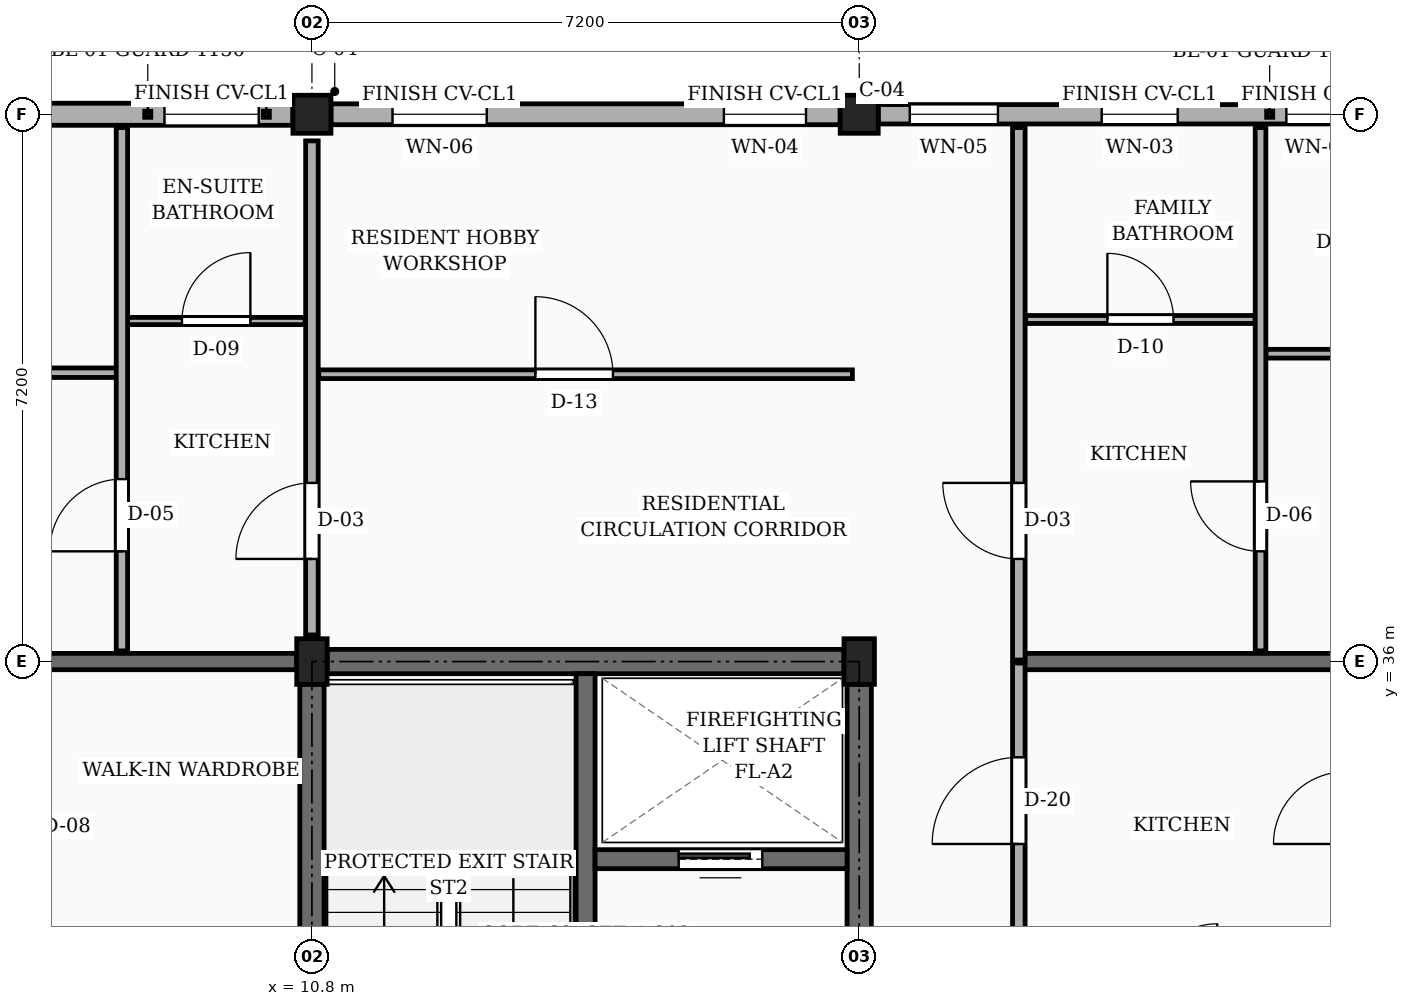
"""IFC4 building model, lengths in metres.
Left out: names, types, materials, properties, quantities, classifications, styles, units other than length and angle.
Written with IfcOpenShell. Run it as: python <this file> out.ifc"""

import sys

from ifc_helpers import new_model, si_unit, direction, frame, frame_2d, origin, origin_2d, place, context, subcontext, project, spatial, rectangle, extrude, element, fill, save


model = new_model("IFC4")
c1 = context("Model", 3, precision=1e-05, world=origin(), true_north=direction((0.0, 1.0)))
c2 = subcontext(c1, "Body", "Model", "MODEL_VIEW")
j1 = project(units=[si_unit("LENGTHUNIT", "METRE"), si_unit("PLANEANGLEUNIT", "RADIAN")], contexts=[c1])
p1 = place(None, origin())
s1 = spatial("IfcSite", under=j1, at=p1, CompositionType="ELEMENT")
p2 = place(p1, origin())
s2 = spatial("IfcBuilding", under=s1, at=p2, CompositionType="ELEMENT")
p3 = place(p2, frame((0.0, 0.0, 32.85)))
s3 = spatial("IfcBuildingStorey", under=s2, at=p3, CompositionType="ELEMENT", Elevation=32.85)
p4 = place(p3, frame((10.8, 36.0, 0.0), z_axis=(0.0, 0.0, 1.0), x_axis=(1.0, 0.0, 0.0)))
e1 = element("IfcColumn", 1, at=p4, inside=s3, PredefinedType="COLUMN", context=c2, shape_type="SweptSolid", body=[
    extrude(rectangle(XDim=0.4, YDim=0.6, at=origin_2d()), origin(), (0.0, 0.0, 1.0), 3.15),
])
p5 = place(p3, frame((10.8, 43.2, 0.0), z_axis=(0.0, 0.0, 1.0), x_axis=(1.0, 0.0, 0.0)))
e2 = element("IfcColumn", 2, at=p5, inside=s3, PredefinedType="COLUMN", context=c2, shape_type="SweptSolid", body=[
    extrude(rectangle(XDim=0.5, YDim=0.5, at=origin_2d()), origin(), (0.0, 0.0, 1.0), 3.15),
])
p6 = place(p3, frame((18.0, 36.0, 0.0), z_axis=(0.0, 0.0, 1.0), x_axis=(1.0, 0.0, 0.0)))
e3 = element("IfcColumn", 3, at=p6, inside=s3, PredefinedType="COLUMN", context=c2, shape_type="SweptSolid", body=[
    extrude(rectangle(XDim=0.4, YDim=0.6, at=origin_2d()), origin(), (0.0, 0.0, 1.0), 3.15),
])
p7 = place(p3, frame((18.0, 43.2, 0.0), z_axis=(0.0, 0.0, 1.0), x_axis=(1.0, 0.0, 0.0)))
e4 = element("IfcColumn", 4, at=p7, inside=s3, PredefinedType="COLUMN", context=c2, shape_type="SweptSolid", body=[
    extrude(rectangle(XDim=0.5, YDim=0.5, at=origin_2d()), origin(), (0.0, 0.0, 1.0), 3.15),
])
p8 = place(p3, frame((3.85, 36.0, 0.0), z_axis=(0.0, 0.0, 1.0), x_axis=(1.0, 0.0, 0.0)))
e5 = element("IfcWall", 5, at=p8, inside=s3, PredefinedType="SOLIDWALL", context=c2, shape_type="SweptSolid", body=[
    extrude(rectangle(XDim=6.75, YDim=0.215, at=frame_2d((3.375, 0.0))), origin(), (0.0, 0.0, 1.0), 2.17),
])
p9 = place(p3, frame((20.1, 36.0, 0.0), z_axis=(0.0, 0.0, 1.0), x_axis=(1.0, 0.0, 0.0)))
e6 = element("IfcWall", 6, at=p9, inside=s3, PredefinedType="SOLIDWALL", context=c2, shape_type="SweptSolid", body=[
    extrude(rectangle(XDim=12.05, YDim=0.215, at=frame_2d((6.025, 0.0))), origin(), (0.0, 0.0, 1.0), 2.17),
])
p10 = place(p3, frame((24.95, 43.2, 0.0), z_axis=(0.0, 0.0, 1.0), x_axis=(-1.0, 0.0, 0.0)))
e7 = element("IfcWall", 7, at=p10, inside=s3, PredefinedType="SOLIDWALL", context=c2, shape_type="SweptSolid", body=[
    extrude(rectangle(XDim=6.7, YDim=0.255, at=frame_2d((3.35, 0.0))), origin(), (0.0, 0.0, 1.0), 2.44),
])
p11 = place(p10, frame((0.48, 0.0, 0.78)))
e8 = element("IfcOpeningElement", 8, at=p11, cuts=e7, PredefinedType="OPENING", context=c2, shape_type="SweptSolid", body=[
    extrude(rectangle(XDim=0.85, YDim=1.15, at=frame_2d((0.425, 0.575))), frame((0.0, 0.137, 0.0), z_axis=(0.0, -1.0, 0.0), x_axis=(1.0, 0.0, 0.0)), (0.0, 0.0, 1.0), 0.275),
])
p12 = place(p10, frame((2.76, 0.0, 0.78)))
e9 = element("IfcOpeningElement", 9, at=p12, cuts=e7, PredefinedType="OPENING", context=c2, shape_type="SweptSolid", body=[
    extrude(rectangle(XDim=1.0, YDim=1.15, at=frame_2d((0.5, 0.575))), frame((0.0, 0.137, 0.0), z_axis=(0.0, -1.0, 0.0), x_axis=(1.0, 0.0, 0.0)), (0.0, 0.0, 1.0), 0.275),
])
p13 = place(p10, frame((5.125, 0.0, 0.78)))
e10 = element("IfcOpeningElement", 10, at=p13, cuts=e7, PredefinedType="OPENING", context=c2, shape_type="SweptSolid", body=[
    extrude(rectangle(XDim=1.16, YDim=1.15, at=frame_2d((0.58, 0.575))), frame((0.0, 0.137, 0.0), z_axis=(0.0, -1.0, 0.0), x_axis=(1.0, 0.0, 0.0)), (0.0, 0.0, 1.0), 0.275),
])
p14 = place(p3, frame((17.75, 43.2, 0.0), z_axis=(0.0, 0.0, 1.0), x_axis=(-1.0, 0.0, 0.0)))
e11 = element("IfcWall", 11, at=p14, inside=s3, PredefinedType="SOLIDWALL", context=c2, shape_type="SweptSolid", body=[
    extrude(rectangle(XDim=6.7, YDim=0.275, at=frame_2d((3.35, 0.0))), origin(), (0.0, 0.0, 1.0), 2.44),
])
p15 = place(p14, frame((0.45, 0.0, 0.78)))
e12 = element("IfcOpeningElement", 12, at=p15, cuts=e11, PredefinedType="OPENING", context=c2, shape_type="SweptSolid", body=[
    extrude(rectangle(XDim=1.08, YDim=1.15, at=frame_2d((0.54, 0.575))), frame((0.0, 0.147, 0.0), z_axis=(0.0, -1.0, 0.0), x_axis=(1.0, 0.0, 0.0)), (0.0, 0.0, 1.0), 0.295),
])
p16 = place(p14, frame((4.65, 0.0, 0.78)))
e13 = element("IfcOpeningElement", 13, at=p16, cuts=e11, PredefinedType="OPENING", context=c2, shape_type="SweptSolid", body=[
    extrude(rectangle(XDim=1.24, YDim=1.15, at=frame_2d((0.62, 0.575))), frame((0.0, 0.147, 0.0), z_axis=(0.0, -1.0, 0.0), x_axis=(1.0, 0.0, 0.0)), (0.0, 0.0, 1.0), 0.295),
])
p17 = place(p3, frame((10.55, 43.2, 0.0), z_axis=(0.0, 0.0, 1.0), x_axis=(-1.0, 0.0, 0.0)))
e14 = element("IfcWall", 14, at=p17, inside=s3, PredefinedType="SOLIDWALL", context=c2, shape_type="SweptSolid", body=[
    extrude(rectangle(XDim=6.7, YDim=0.29, at=frame_2d((3.35, 0.0))), origin(), (0.0, 0.0, 1.0), 2.44),
])
p18 = place(p17, frame((0.45, 0.0, 0.78)))
e15 = element("IfcOpeningElement", 15, at=p18, cuts=e14, PredefinedType="OPENING", context=c2, shape_type="SweptSolid", body=[
    extrude(rectangle(XDim=1.24, YDim=1.15, at=frame_2d((0.62, 0.575))), frame((0.0, 0.155, 0.0), z_axis=(0.0, -1.0, 0.0), x_axis=(1.0, 0.0, 0.0)), (0.0, 0.0, 1.0), 0.31),
])
p19 = place(p17, frame((4.65, 0.0, 0.78)))
e16 = element("IfcOpeningElement", 16, at=p19, cuts=e14, PredefinedType="OPENING", context=c2, shape_type="SweptSolid", body=[
    extrude(rectangle(XDim=1.4, YDim=1.15, at=frame_2d((0.7, 0.575))), frame((0.0, 0.155, 0.0), z_axis=(0.0, -1.0, 0.0), x_axis=(1.0, 0.0, 0.0)), (0.0, 0.0, 1.0), 0.31),
])
p20 = place(p3, frame((10.8, 29.1, 0.0), z_axis=(0.0, 0.0, 1.0), x_axis=(0.0, 1.0, 0.0)))
e17 = element("IfcWall", 17, at=p20, inside=s3, PredefinedType="SHEAR", context=c2, shape_type="SweptSolid", body=[
    extrude(rectangle(XDim=6.6, YDim=0.32, at=frame_2d((3.3, 0.0))), origin(), (0.0, 0.0, 1.0), 2.87),
])
p21 = place(p3, frame((11.0, 36.0, 0.0), z_axis=(0.0, 0.0, 1.0), x_axis=(1.0, 0.0, 0.0)))
e18 = element("IfcWall", 18, at=p21, inside=s3, PredefinedType="SHEAR", context=c2, shape_type="SweptSolid", body=[
    extrude(rectangle(XDim=6.8, YDim=0.32, at=frame_2d((3.4, 0.0))), origin(), (0.0, 0.0, 1.0), 2.87),
])
p22 = place(p3, frame((18.0, 29.1, 0.0), z_axis=(0.0, 0.0, 1.0), x_axis=(0.0, 1.0, 0.0)))
e19 = element("IfcWall", 19, at=p22, inside=s3, PredefinedType="SHEAR", context=c2, shape_type="SweptSolid", body=[
    extrude(rectangle(XDim=6.6, YDim=0.32, at=frame_2d((3.3, 0.0))), origin(), (0.0, 0.0, 1.0), 2.87),
])
p23 = place(p22, frame((1.5, 0.0, 0.0)))
e20 = element("IfcOpeningElement", 20, at=p23, cuts=e19, PredefinedType="OPENING", context=c2, shape_type="SweptSolid", body=[
    extrude(rectangle(XDim=1.1, YDim=2.15, at=frame_2d((0.55, 1.075))), frame((0.0, 0.17, 0.0), z_axis=(0.0, -1.0, 0.0), x_axis=(1.0, 0.0, 0.0)), (0.0, 0.0, 1.0), 0.34),
])
p24 = place(p3, frame((14.4, 28.96, 0.0), z_axis=(0.0, 0.0, 1.0), x_axis=(0.0, 1.0, 0.0)))
e21 = element("IfcWall", 21, at=p24, inside=s3, PredefinedType="SHEAR", context=c2, shape_type="SweptSolid", body=[
    extrude(rectangle(XDim=6.88, YDim=0.25, at=frame_2d((3.44, 0.0))), origin(), (0.0, 0.0, 1.0), 2.87),
])
p25 = place(p24, frame((0.44, 0.0, 0.0)))
e22 = element("IfcOpeningElement", 22, at=p25, cuts=e21, PredefinedType="OPENING", context=c2, shape_type="SweptSolid", body=[
    extrude(rectangle(XDim=1.05, YDim=2.15, at=frame_2d((0.525, 1.075))), frame((0.0, 0.135, 0.0), z_axis=(0.0, -1.0, 0.0), x_axis=(1.0, 0.0, 0.0)), (0.0, 0.0, 1.0), 0.27),
])
p26 = place(p3, frame((14.525, 33.4, 0.0), z_axis=(0.0, 0.0, 1.0), x_axis=(1.0, 0.0, 0.0)))
e23 = element("IfcWall", 23, at=p26, inside=s3, PredefinedType="SHEAR", context=c2, shape_type="SweptSolid", body=[
    extrude(rectangle(XDim=3.315, YDim=0.25, at=frame_2d((1.658, 0.0))), origin(), (0.0, 0.0, 1.0), 2.87),
])
p27 = place(p26, frame((1.1, 0.0, 0.0)))
e24 = element("IfcOpeningElement", 24, at=p27, cuts=e23, PredefinedType="OPENING", context=c2, shape_type="SweptSolid", body=[
    extrude(rectangle(XDim=1.1, YDim=2.2, at=frame_2d((0.55, 1.1))), frame((0.0, 0.135, 0.0), z_axis=(0.0, -1.0, 0.0), x_axis=(1.0, 0.0, 0.0)), (0.0, 0.0, 1.0), 0.27),
])
p28 = place(p3, frame((20.1, 28.82, 0.0), z_axis=(0.0, 0.0, 1.0), x_axis=(0.0, 1.0, 0.0)))
e25 = element("IfcWall", 25, at=p28, inside=s3, PredefinedType="PARTITIONING", context=c2, shape_type="SweptSolid", body=[
    extrude(rectangle(XDim=7.16, YDim=0.165, at=frame_2d((3.58, 0.0))), origin(), (0.0, 0.0, 1.0), 2.305),
])
p29 = place(p28, frame((4.78, 0.0, 0.0)))
e26 = element("IfcOpeningElement", 26, at=p29, cuts=e25, PredefinedType="OPENING", context=c2, shape_type="SweptSolid", body=[
    extrude(rectangle(XDim=1.14, YDim=2.18, at=frame_2d((0.57, 1.09))), frame((0.0, 0.093, 0.0), z_axis=(0.0, -1.0, 0.0), x_axis=(1.0, 0.0, 0.0)), (0.0, 0.0, 1.0), 0.185),
])
p30 = place(p3, frame((20.1, 36.02, 0.0), z_axis=(0.0, 0.0, 1.0), x_axis=(0.0, 1.0, 0.0)))
e27 = element("IfcWall", 27, at=p30, inside=s3, PredefinedType="PARTITIONING", context=c2, shape_type="SweptSolid", body=[
    extrude(rectangle(XDim=7.005, YDim=0.165, at=frame_2d((3.502, 0.0))), origin(), (0.0, 0.0, 1.0), 2.305),
])
p31 = place(p30, frame((1.33, 0.0, 0.0)))
e28 = element("IfcOpeningElement", 28, at=p31, cuts=e27, PredefinedType="OPENING", context=c2, shape_type="SweptSolid", body=[
    extrude(rectangle(XDim=1.0, YDim=2.15, at=frame_2d((0.5, 1.075))), frame((0.0, 0.093, 0.0), z_axis=(0.0, -1.0, 0.0), x_axis=(1.0, 0.0, 0.0)), (0.0, 0.0, 1.0), 0.185),
])
p32 = place(p3, frame((10.8, 36.35, 0.0), z_axis=(0.0, 0.0, 1.0), x_axis=(0.0, 1.0, 0.0)))
e29 = element("IfcWall", 29, at=p32, inside=s3, PredefinedType="PARTITIONING", context=c2, shape_type="SweptSolid", body=[
    extrude(rectangle(XDim=6.5, YDim=0.165, at=frame_2d((3.25, 0.0))), origin(), (0.0, 0.0, 1.0), 2.305),
])
p33 = place(p32, frame((1.0, 0.0, 0.0)))
e30 = element("IfcOpeningElement", 30, at=p33, cuts=e29, PredefinedType="OPENING", context=c2, shape_type="SweptSolid", body=[
    extrude(rectangle(XDim=1.0, YDim=2.15, at=frame_2d((0.5, 1.075))), frame((0.0, 0.093, 0.0), z_axis=(0.0, -1.0, 0.0), x_axis=(1.0, 0.0, 0.0)), (0.0, 0.0, 1.0), 0.185),
])
p34 = place(p3, frame((10.89, 39.78, 0.0), z_axis=(0.0, 0.0, 1.0), x_axis=(1.0, 0.0, 0.0)))
e31 = element("IfcWall", 31, at=p34, inside=s3, PredefinedType="PARTITIONING", context=c2, shape_type="SweptSolid", body=[
    extrude(rectangle(XDim=7.02, YDim=0.115, at=frame_2d((3.51, 0.0))), origin(), (0.0, 0.0, 1.0), 2.305),
])
p35 = place(p34, frame((2.85, 0.0, 0.0)))
e32 = element("IfcOpeningElement", 32, at=p35, cuts=e31, PredefinedType="OPENING", context=c2, shape_type="SweptSolid", body=[
    extrude(rectangle(XDim=1.02, YDim=2.15, at=frame_2d((0.51, 1.075))), frame((0.0, 0.067, 0.0), z_axis=(0.0, -1.0, 0.0), x_axis=(1.0, 0.0, 0.0)), (0.0, 0.0, 1.0), 0.135),
])
p36 = place(p3, frame((3.775, 39.8, 0.0), z_axis=(0.0, 0.0, 1.0), x_axis=(1.0, 0.0, 0.0)))
e33 = element("IfcWall", 33, at=p36, inside=s3, PredefinedType="PARTITIONING", context=c2, shape_type="SweptSolid", body=[
    extrude(rectangle(XDim=4.455, YDim=0.125, at=frame_2d((2.228, 0.0))), origin(), (0.0, 0.0, 1.0), 2.305),
])
p37 = place(p36, frame((1.778, 0.0, 0.0)))
e34 = element("IfcOpeningElement", 34, at=p37, cuts=e33, PredefinedType="OPENING", context=c2, shape_type="SweptSolid", body=[
    extrude(rectangle(XDim=0.9, YDim=2.1, at=frame_2d((0.45, 1.05))), frame((0.0, 0.073, 0.0), z_axis=(0.0, -1.0, 0.0), x_axis=(1.0, 0.0, 0.0)), (0.0, 0.0, 1.0), 0.145),
])
p38 = place(p3, frame((8.37, 40.48, 0.0), z_axis=(0.0, 0.0, 1.0), x_axis=(1.0, 0.0, 0.0)))
e35 = element("IfcWall", 35, at=p38, inside=s3, PredefinedType="PARTITIONING", context=c2, shape_type="SweptSolid", body=[
    extrude(rectangle(XDim=2.34, YDim=0.095, at=frame_2d((1.17, 0.0))), origin(), (0.0, 0.0, 1.0), 2.305),
])
p39 = place(p38, frame((0.72, 0.0, 0.0)))
e36 = element("IfcOpeningElement", 36, at=p39, cuts=e35, PredefinedType="OPENING", context=c2, shape_type="SweptSolid", body=[
    extrude(rectangle(XDim=0.9, YDim=2.05, at=frame_2d((0.45, 1.025))), frame((0.0, 0.058, 0.0), z_axis=(0.0, -1.0, 0.0), x_axis=(1.0, 0.0, 0.0)), (0.0, 0.0, 1.0), 0.115),
])
p40 = place(p3, frame((8.3, 36.14, 0.0), z_axis=(0.0, 0.0, 1.0), x_axis=(0.0, 1.0, 0.0)))
e37 = element("IfcWall", 37, at=p40, inside=s3, PredefinedType="PARTITIONING", context=c2, shape_type="SweptSolid", body=[
    extrude(rectangle(XDim=6.885, YDim=0.15, at=frame_2d((3.442, 0.0))), origin(), (0.0, 0.0, 1.0), 2.305),
])
p41 = place(p40, frame((1.31, 0.0, 0.0)))
e38 = element("IfcOpeningElement", 38, at=p41, cuts=e37, PredefinedType="OPENING", context=c2, shape_type="SweptSolid", body=[
    extrude(rectangle(XDim=0.95, YDim=2.1, at=frame_2d((0.475, 1.05))), frame((0.0, 0.085, 0.0), z_axis=(0.0, -1.0, 0.0), x_axis=(1.0, 0.0, 0.0)), (0.0, 0.0, 1.0), 0.17),
])
p42 = place(p3, frame((23.35, 40.05, 0.0), z_axis=(0.0, 0.0, 1.0), x_axis=(1.0, 0.0, 0.0)))
e39 = element("IfcWall", 39, at=p42, inside=s3, PredefinedType="PARTITIONING", context=c2, shape_type="SweptSolid", body=[
    extrude(rectangle(XDim=8.875, YDim=0.115, at=frame_2d((4.438, 0.0))), origin(), (0.0, 0.0, 1.0), 2.305),
])
p43 = place(p42, frame((3.998, 0.0, 0.0)))
e40 = element("IfcOpeningElement", 40, at=p43, cuts=e39, PredefinedType="OPENING", context=c2, shape_type="SweptSolid", body=[
    extrude(rectangle(XDim=0.88, YDim=2.08, at=frame_2d((0.44, 1.04))), frame((0.0, 0.067, 0.0), z_axis=(0.0, -1.0, 0.0), x_axis=(1.0, 0.0, 0.0)), (0.0, 0.0, 1.0), 0.135),
])
p44 = place(p3, frame((20.19, 40.5, 0.0), z_axis=(0.0, 0.0, 1.0), x_axis=(1.0, 0.0, 0.0)))
e41 = element("IfcWall", 41, at=p44, inside=s3, PredefinedType="PARTITIONING", context=c2, shape_type="SweptSolid", body=[
    extrude(rectangle(XDim=3.02, YDim=0.105, at=frame_2d((1.51, 0.0))), origin(), (0.0, 0.0, 1.0), 2.305),
])
p45 = place(p44, frame((1.075, 0.0, 0.0)))
e42 = element("IfcOpeningElement", 42, at=p45, cuts=e41, PredefinedType="OPENING", context=c2, shape_type="SweptSolid", body=[
    extrude(rectangle(XDim=0.87, YDim=2.05, at=frame_2d((0.435, 1.025))), frame((0.0, 0.062, 0.0), z_axis=(0.0, -1.0, 0.0), x_axis=(1.0, 0.0, 0.0)), (0.0, 0.0, 1.0), 0.125),
])
p46 = place(p3, frame((23.28, 36.14, 0.0), z_axis=(0.0, 0.0, 1.0), x_axis=(0.0, 1.0, 0.0)))
e43 = element("IfcWall", 43, at=p46, inside=s3, PredefinedType="PARTITIONING", context=c2, shape_type="SweptSolid", body=[
    extrude(rectangle(XDim=6.885, YDim=0.14, at=frame_2d((3.442, 0.0))), origin(), (0.0, 0.0, 1.0), 2.305),
])
p47 = place(p46, frame((1.31, 0.0, 0.0)))
e44 = element("IfcOpeningElement", 44, at=p47, cuts=e43, PredefinedType="OPENING", context=c2, shape_type="SweptSolid", body=[
    extrude(rectangle(XDim=0.92, YDim=2.1, at=frame_2d((0.46, 1.05))), frame((0.0, 0.08, 0.0), z_axis=(0.0, -1.0, 0.0), x_axis=(1.0, 0.0, 0.0)), (0.0, 0.0, 1.0), 0.16),
])
p48 = place(p11, origin())
e45 = element("IfcWindow", 45, at=p48, inside=s3, PartitioningType="SINGLE_PANEL", PredefinedType="WINDOW", context=c2, shape_type="SweptSolid", body=[
    extrude(rectangle(XDim=0.85, YDim=1.15, at=frame_2d((0.425, 0.575))), frame((0.0, 0.03, 0.0), z_axis=(0.0, -1.0, 0.0), x_axis=(1.0, 0.0, 0.0)), (0.0, 0.0, 1.0), 0.06),
])
fill(e8, e45)
p49 = place(p12, origin())
e46 = element("IfcWindow", 46, at=p49, inside=s3, PartitioningType="SINGLE_PANEL", PredefinedType="WINDOW", context=c2, shape_type="SweptSolid", body=[
    extrude(rectangle(XDim=1.0, YDim=1.15, at=frame_2d((0.5, 0.575))), frame((0.0, 0.03, 0.0), z_axis=(0.0, -1.0, 0.0), x_axis=(1.0, 0.0, 0.0)), (0.0, 0.0, 1.0), 0.06),
])
fill(e9, e46)
p50 = place(p13, origin())
e47 = element("IfcWindow", 47, at=p50, inside=s3, PartitioningType="SINGLE_PANEL", PredefinedType="WINDOW", context=c2, shape_type="SweptSolid", body=[
    extrude(rectangle(XDim=1.16, YDim=1.15, at=frame_2d((0.58, 0.575))), frame((0.0, 0.03, 0.0), z_axis=(0.0, -1.0, 0.0), x_axis=(1.0, 0.0, 0.0)), (0.0, 0.0, 1.0), 0.06),
])
fill(e10, e47)
p51 = place(p15, origin())
e48 = element("IfcWindow", 48, at=p51, inside=s3, PartitioningType="SINGLE_PANEL", PredefinedType="WINDOW", context=c2, shape_type="SweptSolid", body=[
    extrude(rectangle(XDim=1.08, YDim=1.15, at=frame_2d((0.54, 0.575))), frame((0.0, 0.03, 0.0), z_axis=(0.0, -1.0, 0.0), x_axis=(1.0, 0.0, 0.0)), (0.0, 0.0, 1.0), 0.06),
])
fill(e12, e48)
p52 = place(p16, origin())
e49 = element("IfcWindow", 49, at=p52, inside=s3, PartitioningType="SINGLE_PANEL", PredefinedType="WINDOW", context=c2, shape_type="SweptSolid", body=[
    extrude(rectangle(XDim=1.24, YDim=1.15, at=frame_2d((0.62, 0.575))), frame((0.0, 0.03, 0.0), z_axis=(0.0, -1.0, 0.0), x_axis=(1.0, 0.0, 0.0)), (0.0, 0.0, 1.0), 0.06),
])
fill(e13, e49)
p53 = place(p18, origin())
e50 = element("IfcWindow", 50, at=p53, inside=s3, PartitioningType="SINGLE_PANEL", PredefinedType="WINDOW", context=c2, shape_type="SweptSolid", body=[
    extrude(rectangle(XDim=1.24, YDim=1.15, at=frame_2d((0.62, 0.575))), frame((0.0, 0.03, 0.0), z_axis=(0.0, -1.0, 0.0), x_axis=(1.0, 0.0, 0.0)), (0.0, 0.0, 1.0), 0.06),
])
fill(e15, e50)
p54 = place(p27, origin())
e51 = element("IfcDoor", 51, at=p54, inside=s3, OperationType="SLIDING_TO_LEFT", PredefinedType="DOOR", context=c2, shape_type="SweptSolid", body=[
    extrude(rectangle(XDim=1.1, YDim=2.2, at=frame_2d((0.55, 1.1))), frame((0.0, 0.025, 0.0), z_axis=(0.0, -1.0, 0.0), x_axis=(1.0, 0.0, 0.0)), (0.0, 0.0, 1.0), 0.05),
])
fill(e24, e51)
p55 = place(p29, origin())
e52 = element("IfcDoor", 52, at=p55, inside=s3, OperationType="SINGLE_SWING_LEFT", PredefinedType="DOOR", context=c2, shape_type="SweptSolid", body=[
    extrude(rectangle(XDim=1.14, YDim=2.18, at=frame_2d((0.57, 1.09))), frame((0.0, 0.025, 0.0), z_axis=(0.0, -1.0, 0.0), x_axis=(1.0, 0.0, 0.0)), (0.0, 0.0, 1.0), 0.05),
])
fill(e26, e52)
p56 = place(p31, origin())
e53 = element("IfcDoor", 53, at=p56, inside=s3, OperationType="SINGLE_SWING_RIGHT", PredefinedType="DOOR", context=c2, shape_type="SweptSolid", body=[
    extrude(rectangle(XDim=1.0, YDim=2.15, at=frame_2d((0.5, 1.075))), frame((0.0, 0.025, 0.0), z_axis=(0.0, -1.0, 0.0), x_axis=(1.0, 0.0, 0.0)), (0.0, 0.0, 1.0), 0.05),
])
fill(e28, e53)
p57 = place(p33, origin())
e54 = element("IfcDoor", 54, at=p57, inside=s3, OperationType="SINGLE_SWING_LEFT", PredefinedType="DOOR", context=c2, shape_type="SweptSolid", body=[
    extrude(rectangle(XDim=1.0, YDim=2.15, at=frame_2d((0.5, 1.075))), frame((0.0, 0.025, 0.0), z_axis=(0.0, -1.0, 0.0), x_axis=(1.0, 0.0, 0.0)), (0.0, 0.0, 1.0), 0.05),
])
fill(e30, e54)
p58 = place(p35, origin())
e55 = element("IfcDoor", 55, at=p58, inside=s3, OperationType="SINGLE_SWING_LEFT", PredefinedType="DOOR", context=c2, shape_type="SweptSolid", body=[
    extrude(rectangle(XDim=1.02, YDim=2.15, at=frame_2d((0.51, 1.075))), frame((0.0, 0.025, 0.0), z_axis=(0.0, -1.0, 0.0), x_axis=(1.0, 0.0, 0.0)), (0.0, 0.0, 1.0), 0.05),
])
fill(e32, e55)
p59 = place(p39, origin())
e56 = element("IfcDoor", 56, at=p59, inside=s3, OperationType="SINGLE_SWING_RIGHT", PredefinedType="DOOR", context=c2, shape_type="SweptSolid", body=[
    extrude(rectangle(XDim=0.9, YDim=2.05, at=frame_2d((0.45, 1.025))), frame((0.0, 0.025, 0.0), z_axis=(0.0, -1.0, 0.0), x_axis=(1.0, 0.0, 0.0)), (0.0, 0.0, 1.0), 0.05),
])
fill(e36, e56)
p60 = place(p41, origin())
e57 = element("IfcDoor", 57, at=p60, inside=s3, OperationType="SINGLE_SWING_LEFT", PredefinedType="DOOR", context=c2, shape_type="SweptSolid", body=[
    extrude(rectangle(XDim=0.95, YDim=2.1, at=frame_2d((0.475, 1.05))), frame((0.0, 0.025, 0.0), z_axis=(0.0, -1.0, 0.0), x_axis=(1.0, 0.0, 0.0)), (0.0, 0.0, 1.0), 0.05),
])
fill(e38, e57)
p61 = place(p45, origin())
e58 = element("IfcDoor", 58, at=p61, inside=s3, OperationType="SINGLE_SWING_LEFT", PredefinedType="DOOR", context=c2, shape_type="SweptSolid", body=[
    extrude(rectangle(XDim=0.87, YDim=2.05, at=frame_2d((0.435, 1.025))), frame((0.0, 0.025, 0.0), z_axis=(0.0, -1.0, 0.0), x_axis=(1.0, 0.0, 0.0)), (0.0, 0.0, 1.0), 0.05),
])
fill(e42, e58)
p62 = place(p47, origin())
e59 = element("IfcDoor", 59, at=p62, inside=s3, OperationType="SINGLE_SWING_RIGHT", PredefinedType="DOOR", context=c2, shape_type="SweptSolid", body=[
    extrude(rectangle(XDim=0.92, YDim=2.1, at=frame_2d((0.46, 1.05))), frame((0.0, 0.025, 0.0), z_axis=(0.0, -1.0, 0.0), x_axis=(1.0, 0.0, 0.0)), (0.0, 0.0, 1.0), 0.05),
])
fill(e44, e59)
save(model, sys.argv[1])
